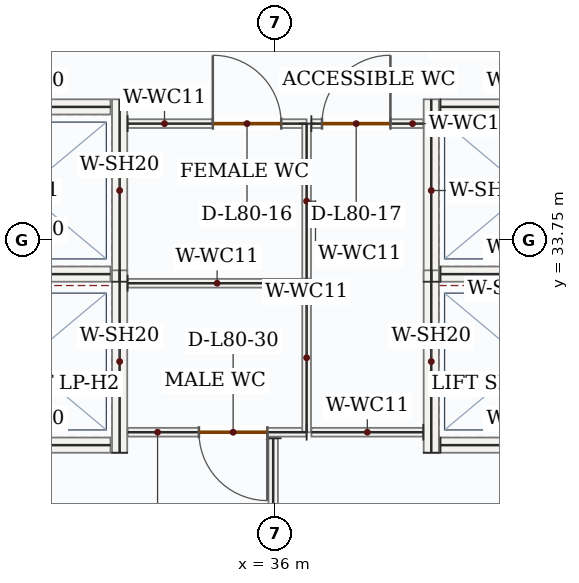
"""IFC4 building model, lengths in metres.
Left out: names, types, materials, properties, quantities, classifications, styles, units other than length and angle.
Written with IfcOpenShell. Run it as: python <this file> out.ifc"""

import sys

from ifc_helpers import new_model, si_unit, direction, frame, frame_2d, origin, place, context, subcontext, project, spatial, rectangle, extrude, source, transform, mapped, element, fill, save


model = new_model("IFC4")
c1 = context("Model", 3, precision=1e-05, world=origin(), true_north=direction((0.0, 1.0)))
c2 = subcontext(c1, "Body", "Model", "MODEL_VIEW")
j1 = project(units=[si_unit("LENGTHUNIT", "METRE"), si_unit("PLANEANGLEUNIT", "RADIAN")], contexts=[c1])
p1 = place(None, origin())
s1 = spatial("IfcSite", under=j1, at=p1, CompositionType="ELEMENT")
p2 = place(p1, origin())
s2 = spatial("IfcBuilding", under=s1, at=p2, CompositionType="ELEMENT")
p3 = place(p2, frame((0.0, 0.0, 331.05)))
s3 = spatial("IfcBuildingStorey", under=s2, at=p3, CompositionType="ELEMENT", Elevation=331.05)
m1 = source(origin(), c2, "Body", "SweptSolid", [
    extrude(rectangle(XDim=2.4, YDim=0.2, at=frame_2d((1.2, 0.0))), origin(), (0.0, 0.0, 1.0), 3.5),
])
p4 = place(p3, frame((33.95, 33.2, 0.0), z_axis=(0.0, 0.0, 1.0), x_axis=(0.0, 1.0, 0.0)))
e1 = element("IfcWall", 1, at=p4, inside=s3, PredefinedType="SOLIDWALL", context=c2, shape_type="MappedRepresentation", body=[
    mapped(m1, transform((0.0, 0.0, 0.0), x_axis=(1.0, 0.0, 0.0), y_axis=(0.0, 1.0, 0.0), z_axis=(0.0, 0.0, 1.0), scale=1.0)),
])
m2 = source(origin(), c2, "Body", "SweptSolid", [
    extrude(rectangle(XDim=2.26, YDim=0.2, at=frame_2d((1.13, 0.0))), origin(), (0.0, 0.0, 1.0), 3.5),
])
for number, where, z_axis, x_axis in (
    (2, (31.57, 33.3, 0.0), (0.0, 0.0, 1.0), (1.0, 0.0, 0.0)),
    (3, (31.57, 35.5, 0.0), (0.0, 0.0, 1.0), (1.0, 0.0, 0.0)),
):
    element("IfcWall", number, at=place(p3, frame(where, z_axis=z_axis, x_axis=x_axis)), inside=s3, PredefinedType="SOLIDWALL", context=c2, shape_type="MappedRepresentation", body=[
        mapped(m2, transform((0.0, 0.0, 0.0), x_axis=(1.0, 0.0, 0.0), y_axis=(0.0, 1.0, 0.0), z_axis=(0.0, 0.0, 1.0), scale=1.0)),
    ])
p5 = place(p3, frame((33.95, 30.95, 0.0), z_axis=(0.0, 0.0, 1.0), x_axis=(0.0, 1.0, 0.0)))
e4 = element("IfcWall", 4, at=p5, inside=s3, PredefinedType="SOLIDWALL", context=c2, shape_type="MappedRepresentation", body=[
    mapped(m1, transform((0.0, 0.0, 0.0), x_axis=(1.0, 0.0, 0.0), y_axis=(0.0, 1.0, 0.0), z_axis=(0.0, 0.0, 1.0), scale=1.0)),
])
p6 = place(p3, frame((31.57, 31.05, 0.0), z_axis=(0.0, 0.0, 1.0), x_axis=(1.0, 0.0, 0.0)))
e5 = element("IfcWall", 5, at=p6, inside=s3, PredefinedType="SOLIDWALL", context=c2, shape_type="MappedRepresentation", body=[
    mapped(m2, transform((0.0, 0.0, 0.0), x_axis=(1.0, 0.0, 0.0), y_axis=(0.0, 1.0, 0.0), z_axis=(0.0, 0.0, 1.0), scale=1.0)),
])
p7 = place(p3, frame((38.05, 33.2, 0.0), z_axis=(0.0, 0.0, 1.0), x_axis=(0.0, 1.0, 0.0)))
e6 = element("IfcWall", 6, at=p7, inside=s3, PredefinedType="SOLIDWALL", context=c2, shape_type="MappedRepresentation", body=[
    mapped(m1, transform((0.0, 0.0, 0.0), x_axis=(1.0, 0.0, 0.0), y_axis=(0.0, 1.0, 0.0), z_axis=(0.0, 0.0, 1.0), scale=1.0)),
])
for number, where, z_axis, x_axis in (
    (7, (38.17, 33.3, 0.0), (0.0, 0.0, 1.0), (1.0, 0.0, 0.0)),
    (8, (38.17, 35.5, 0.0), (0.0, 0.0, 1.0), (1.0, 0.0, 0.0)),
):
    element("IfcWall", number, at=place(p3, frame(where, z_axis=z_axis, x_axis=x_axis)), inside=s3, PredefinedType="SOLIDWALL", context=c2, shape_type="MappedRepresentation", body=[
        mapped(m2, transform((0.0, 0.0, 0.0), x_axis=(1.0, 0.0, 0.0), y_axis=(0.0, 1.0, 0.0), z_axis=(0.0, 0.0, 1.0), scale=1.0)),
    ])
p8 = place(p3, frame((38.05, 30.95, 0.0), z_axis=(0.0, 0.0, 1.0), x_axis=(0.0, 1.0, 0.0)))
e9 = element("IfcWall", 9, at=p8, inside=s3, PredefinedType="SOLIDWALL", context=c2, shape_type="MappedRepresentation", body=[
    mapped(m1, transform((0.0, 0.0, 0.0), x_axis=(1.0, 0.0, 0.0), y_axis=(0.0, 1.0, 0.0), z_axis=(0.0, 0.0, 1.0), scale=1.0)),
])
p9 = place(p3, frame((38.17, 31.05, 0.0), z_axis=(0.0, 0.0, 1.0), x_axis=(1.0, 0.0, 0.0)))
e10 = element("IfcWall", 10, at=p9, inside=s3, PredefinedType="SOLIDWALL", context=c2, shape_type="MappedRepresentation", body=[
    mapped(m2, transform((0.0, 0.0, 0.0), x_axis=(1.0, 0.0, 0.0), y_axis=(0.0, 1.0, 0.0), z_axis=(0.0, 0.0, 1.0), scale=1.0)),
])
p10 = place(p3, frame((36.41, 31.22, 0.0), z_axis=(0.0, 0.0, 1.0), x_axis=(-1.0, 0.0, 0.0)))
e11 = element("IfcWall", 11, at=p10, inside=s3, PredefinedType="PARTITIONING", context=c2, shape_type="SweptSolid", body=[
    extrude(rectangle(XDim=2.355, YDim=0.115, at=frame_2d((1.177, 0.0))), origin(), (0.0, 0.0, 1.0), 3.5),
])
p11 = place(p10, frame((0.517, 0.0, 0.0)))
e12 = element("IfcOpeningElement", 12, at=p11, cuts=e11, PredefinedType="OPENING", context=c2, shape_type="SweptSolid", body=[
    extrude(rectangle(XDim=0.9, YDim=2.1, at=frame_2d((0.45, 1.05))), frame((0.0, 0.067, 0.0), z_axis=(0.0, -1.0, 0.0), x_axis=(1.0, 0.0, 0.0)), (0.0, 0.0, 1.0), 0.135),
])
m3 = source(origin(), c2, "Body", "SweptSolid", [
    extrude(rectangle(XDim=2.355, YDim=0.115, at=frame_2d((1.177, 0.0))), origin(), (0.0, 0.0, 1.0), 3.5),
])
p12 = place(p3, frame((34.055, 33.18, 0.0), z_axis=(0.0, 0.0, 1.0), x_axis=(1.0, 0.0, 0.0)))
e13 = element("IfcWall", 13, at=p12, inside=s3, PredefinedType="PARTITIONING", context=c2, shape_type="MappedRepresentation", body=[
    mapped(m3, transform((0.0, 0.0, 0.0), x_axis=(1.0, 0.0, 0.0), y_axis=(0.0, 1.0, 0.0), z_axis=(0.0, 0.0, 1.0), scale=1.0)),
])
m4 = source(origin(), c2, "Body", "SweptSolid", [
    extrude(rectangle(XDim=1.96, YDim=0.115, at=frame_2d((0.98, 0.0))), origin(), (0.0, 0.0, 1.0), 3.5),
])
p13 = place(p3, frame((36.41, 33.18, 0.0), z_axis=(0.0, 0.0, 1.0), x_axis=(0.0, -1.0, 0.0)))
e14 = element("IfcWall", 14, at=p13, inside=s3, PredefinedType="PARTITIONING", context=c2, shape_type="MappedRepresentation", body=[
    mapped(m4, transform((0.0, 0.0, 0.0), x_axis=(1.0, 0.0, 0.0), y_axis=(0.0, 1.0, 0.0), z_axis=(0.0, 0.0, 1.0), scale=1.0)),
])
p14 = place(p3, frame((34.055, 35.28, 0.0), z_axis=(0.0, 0.0, 1.0), x_axis=(1.0, 0.0, 0.0)))
e15 = element("IfcWall", 15, at=p14, inside=s3, PredefinedType="PARTITIONING", context=c2, shape_type="SweptSolid", body=[
    extrude(rectangle(XDim=2.355, YDim=0.115, at=frame_2d((1.177, 0.0))), origin(), (0.0, 0.0, 1.0), 3.5),
])
p15 = place(p14, frame((1.121, 0.0, 0.0)))
e16 = element("IfcOpeningElement", 16, at=p15, cuts=e15, PredefinedType="OPENING", context=c2, shape_type="SweptSolid", body=[
    extrude(rectangle(XDim=0.9, YDim=2.1, at=frame_2d((0.45, 1.05))), frame((0.0, 0.067, 0.0), z_axis=(0.0, -1.0, 0.0), x_axis=(1.0, 0.0, 0.0)), (0.0, 0.0, 1.0), 0.135),
])
m5 = source(origin(), c2, "Body", "SweptSolid", [
    extrude(rectangle(XDim=2.04, YDim=0.115, at=frame_2d((1.02, 0.0))), origin(), (0.0, 0.0, 1.0), 3.5),
])
p16 = place(p3, frame((36.41, 35.28, 0.0), z_axis=(0.0, 0.0, 1.0), x_axis=(0.0, -1.0, 0.0)))
e17 = element("IfcWall", 17, at=p16, inside=s3, PredefinedType="PARTITIONING", context=c2, shape_type="MappedRepresentation", body=[
    mapped(m5, transform((0.0, 0.0, 0.0), x_axis=(1.0, 0.0, 0.0), y_axis=(0.0, 1.0, 0.0), z_axis=(0.0, 0.0, 1.0), scale=1.0)),
])
m6 = source(origin(), c2, "Body", "SweptSolid", [
    extrude(rectangle(XDim=1.473, YDim=0.115, at=frame_2d((0.736, 0.0))), origin(), (0.0, 0.0, 1.0), 3.5),
])
p17 = place(p3, frame((37.945, 31.22, 0.0), z_axis=(0.0, 0.0, 1.0), x_axis=(-1.0, 0.0, 0.0)))
e18 = element("IfcWall", 18, at=p17, inside=s3, PredefinedType="PARTITIONING", context=c2, shape_type="MappedRepresentation", body=[
    mapped(m6, transform((0.0, 0.0, 0.0), x_axis=(1.0, 0.0, 0.0), y_axis=(0.0, 1.0, 0.0), z_axis=(0.0, 0.0, 1.0), scale=1.0)),
])
p18 = place(p3, frame((36.472, 35.28, 0.0), z_axis=(0.0, 0.0, 1.0), x_axis=(1.0, 0.0, 0.0)))
e19 = element("IfcWall", 19, at=p18, inside=s3, PredefinedType="PARTITIONING", context=c2, shape_type="SweptSolid", body=[
    extrude(rectangle(XDim=1.473, YDim=0.115, at=frame_2d((0.736, 0.0))), origin(), (0.0, 0.0, 1.0), 3.5),
])
p19 = place(p18, frame((0.14, 0.0, 0.0)))
e20 = element("IfcOpeningElement", 20, at=p19, cuts=e19, PredefinedType="OPENING", context=c2, shape_type="SweptSolid", body=[
    extrude(rectangle(XDim=0.9, YDim=2.1, at=frame_2d((0.45, 1.05))), frame((0.0, 0.067, 0.0), z_axis=(0.0, -1.0, 0.0), x_axis=(1.0, 0.0, 0.0)), (0.0, 0.0, 1.0), 0.135),
])
m7 = source(origin(), c2, "Body", "SweptSolid", [
    extrude(rectangle(XDim=3.2, YDim=0.125, at=frame_2d((1.6, 0.0))), origin(), (0.0, 0.0, 1.0), 3.5),
])
p20 = place(p3, frame((35.97, 31.14, 0.0), z_axis=(0.0, 0.0, 1.0), x_axis=(0.0, -1.0, 0.0)))
e21 = element("IfcWall", 21, at=p20, inside=s3, PredefinedType="PARTITIONING", context=c2, shape_type="MappedRepresentation", body=[
    mapped(m7, transform((0.0, 0.0, 0.0), x_axis=(1.0, 0.0, 0.0), y_axis=(0.0, 1.0, 0.0), z_axis=(0.0, 0.0, 1.0), scale=1.0)),
])
m8 = source(origin(), c2, "Body", "SweptSolid", [
    extrude(rectangle(XDim=0.9, YDim=2.1, at=frame_2d((0.45, 1.05))), frame((0.0, 0.025, 0.0), z_axis=(0.0, -1.0, 0.0), x_axis=(1.0, 0.0, 0.0)), (0.0, 0.0, 1.0), 0.05),
])
p21 = place(p15, origin())
e22 = element("IfcDoor", 22, at=p21, inside=s3, OperationType="SINGLE_SWING_LEFT", PredefinedType="DOOR", context=c2, shape_type="MappedRepresentation", body=[
    mapped(m8, transform((0.0, 0.0, 0.0), x_axis=(1.0, 0.0, 0.0), y_axis=(0.0, 1.0, 0.0), z_axis=(0.0, 0.0, 1.0), scale=1.0)),
])
fill(e16, e22)
p22 = place(p19, origin())
e23 = element("IfcDoor", 23, at=p22, inside=s3, OperationType="SINGLE_SWING_RIGHT", PredefinedType="DOOR", context=c2, shape_type="MappedRepresentation", body=[
    mapped(m8, transform((0.0, 0.0, 0.0), x_axis=(1.0, 0.0, 0.0), y_axis=(0.0, 1.0, 0.0), z_axis=(0.0, 0.0, 1.0), scale=1.0)),
])
fill(e20, e23)
p23 = place(p11, origin())
e24 = element("IfcDoor", 24, at=p23, inside=s3, OperationType="SINGLE_SWING_LEFT", PredefinedType="DOOR", context=c2, shape_type="MappedRepresentation", body=[
    mapped(m8, transform((0.0, 0.0, 0.0), x_axis=(1.0, 0.0, 0.0), y_axis=(0.0, 1.0, 0.0), z_axis=(0.0, 0.0, 1.0), scale=1.0)),
])
fill(e12, e24)
save(model, sys.argv[1])
